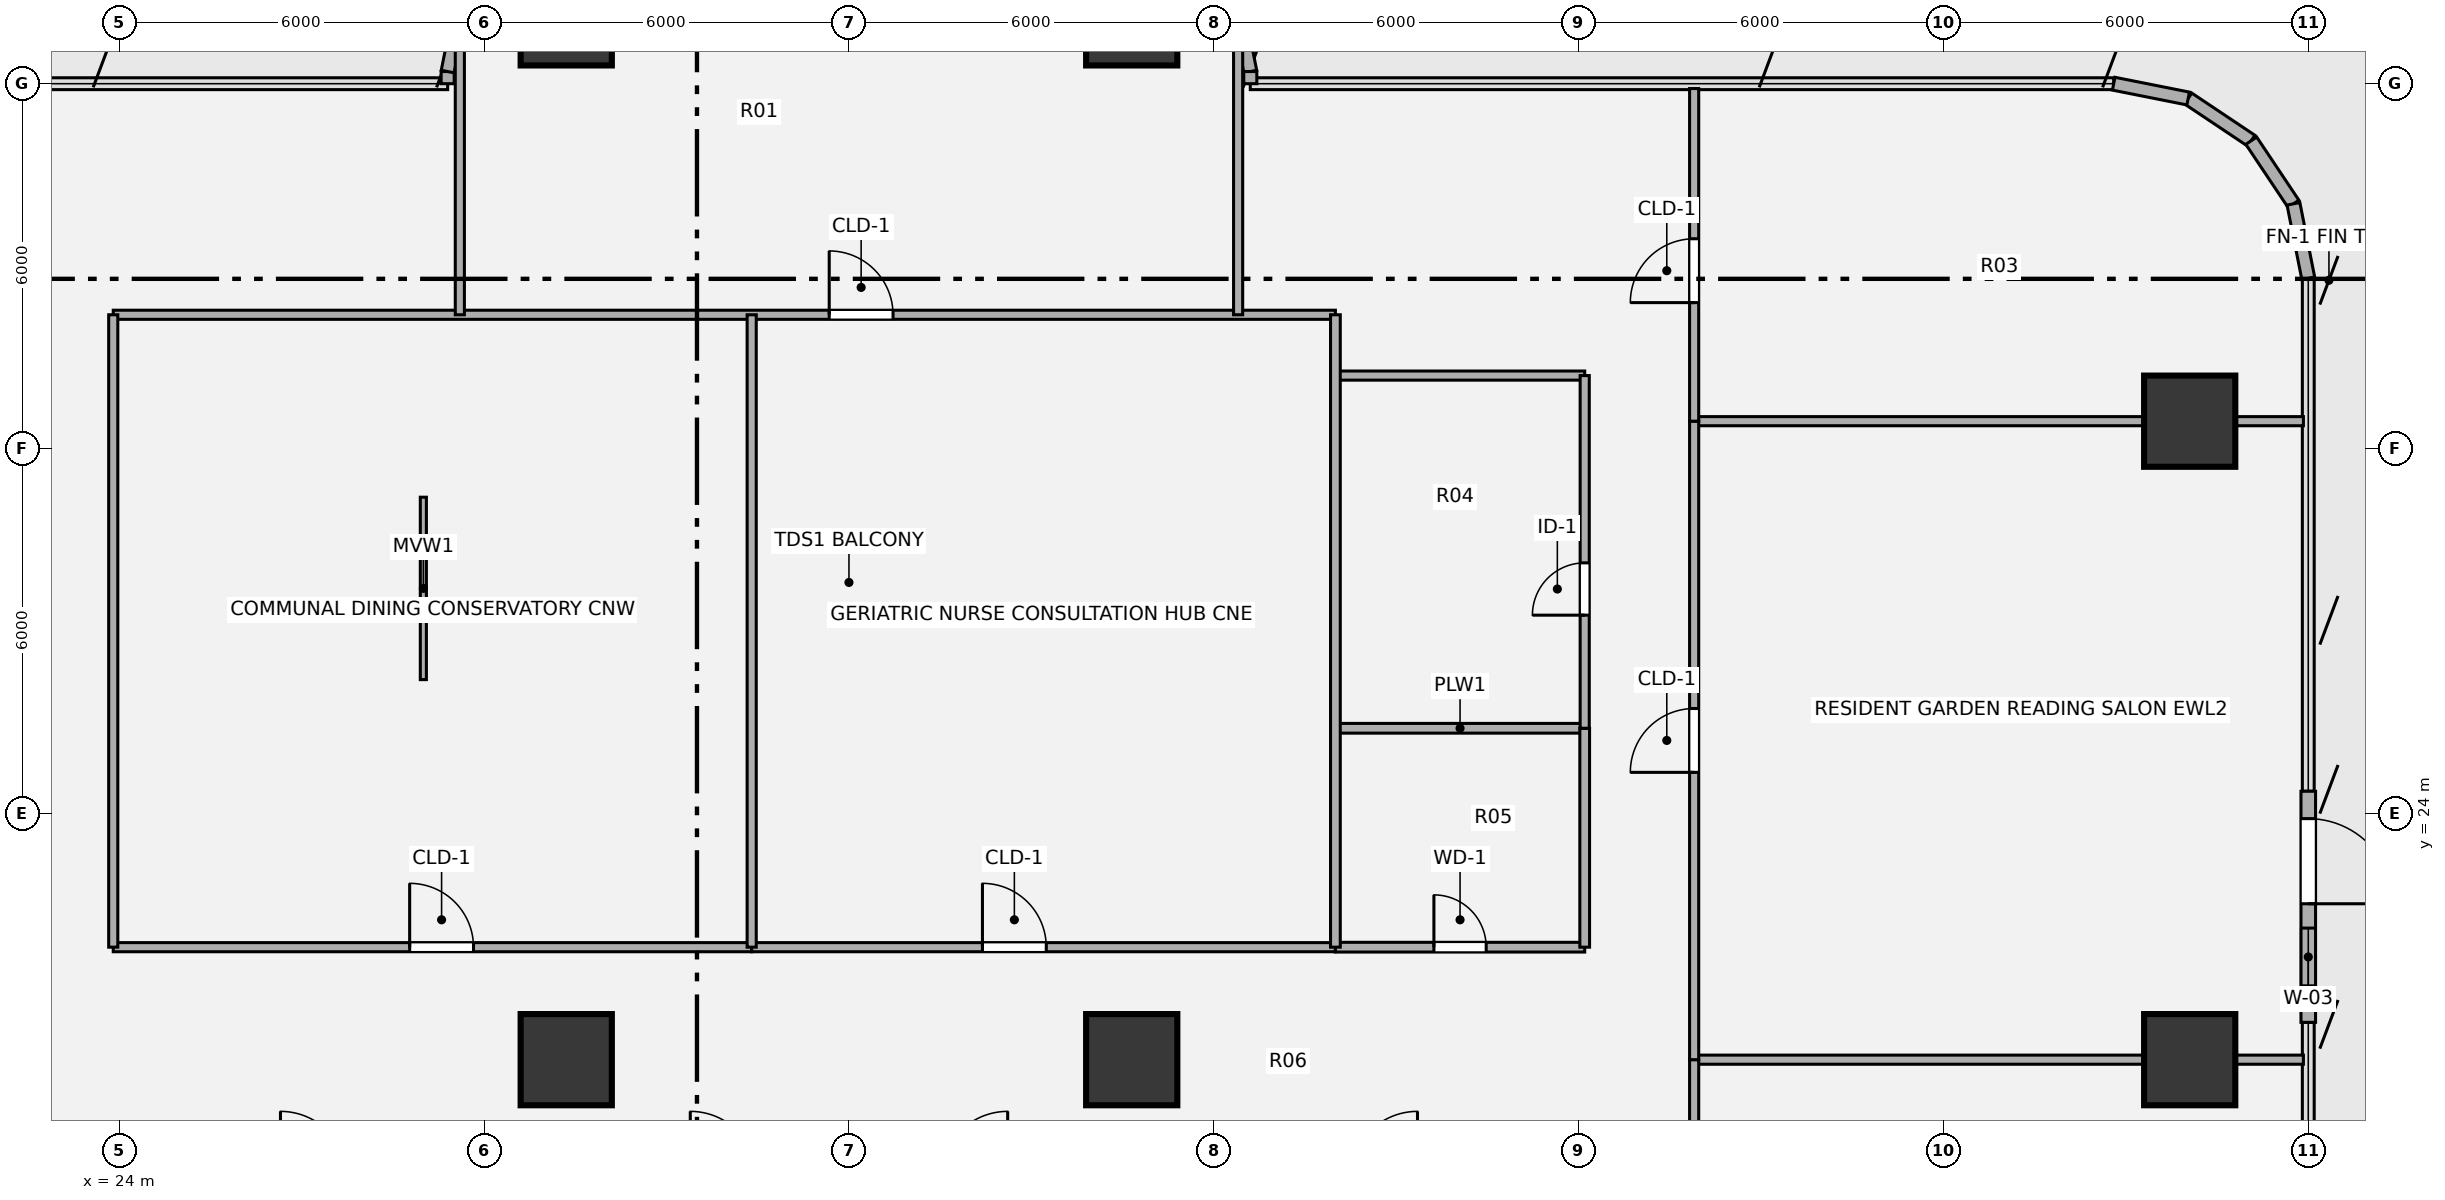
"""IFC4 building model, lengths in metres.
Left out: names, types, materials, properties, quantities, classifications, styles, units other than length and angle.
Written with IfcOpenShell. Run it as: python <this file> out.ifc"""

import sys

from ifc_helpers import new_model, si_unit, direction, frame, frame_2d, origin, origin_2d, place, context, subcontext, project, spatial, rectangle, hollow_circle, extrude, source, transform, mapped, element, fill, save


model = new_model("IFC4")
c1 = context("Model", 3, precision=1e-05, world=origin(), true_north=direction((0.0, 1.0)))
c2 = subcontext(c1, "Body", "Model", "MODEL_VIEW")
j1 = project(units=[si_unit("LENGTHUNIT", "METRE"), si_unit("PLANEANGLEUNIT", "RADIAN")], contexts=[c1])
p1 = place(None, origin())
s1 = spatial("IfcSite", under=j1, at=p1, CompositionType="ELEMENT")
p2 = place(p1, origin())
s2 = spatial("IfcBuilding", under=s1, at=p2, CompositionType="ELEMENT")
p3 = place(p2, frame((0.0, 0.0, 27.0)))
s3 = spatial("IfcBuildingStorey", under=s2, at=p3, CompositionType="ELEMENT", Elevation=27.0)
m1 = source(origin(), c2, "Body", "SweptSolid", [
    extrude(hollow_circle(Radius=0.75, WallThickness=0.05, at=origin_2d()), origin(), (0.0, 0.0, 1.0), 3.78),
])
for number, where, z_axis, x_axis in (
    (1, (58.05, 19.95, 0.0), (0.0, 0.0, 1.0), (1.0, 0.0, 0.0)),
    (2, (58.05, 30.45, 0.0), (0.0, 0.0, 1.0), (1.0, 0.0, 0.0)),
    (3, (31.35, 19.95, 0.0), (0.0, 0.0, 1.0), (1.0, 0.0, 0.0)),
    (4, (40.65, 19.95, 0.0), (0.0, 0.0, 1.0), (1.0, 0.0, 0.0)),
    (5, (31.35, 37.05, 0.0), (0.0, 0.0, 1.0), (1.0, 0.0, 0.0)),
    (6, (40.65, 37.05, 0.0), (0.0, 0.0, 1.0), (1.0, 0.0, 0.0)),
):
    element("IfcColumn", number, at=place(p3, frame(where, z_axis=z_axis, x_axis=x_axis)), inside=s3, PredefinedType="COLUMN", context=c2, shape_type="MappedRepresentation", body=[
        mapped(m1, transform((0.0, 0.0, 0.0), x_axis=(1.0, 0.0, 0.0), y_axis=(0.0, 1.0, 0.0), z_axis=(0.0, 0.0, 1.0), scale=1.0)),
    ])
for number, where, z_axis, x_axis in (
    (7, (58.025, 35.756, 0.0), (0.0, 0.0, 1.0), (0.831, -0.556, 0.0)),
    (8, (59.063, 35.063, 0.0), (0.0, 0.0, 1.0), (0.556, -0.831, 0.0)),
    (9, (59.756, 34.025, 0.0), (0.0, 0.0, 1.0), (0.195, -0.981, 0.0)),
):
    element("IfcWall", number, at=place(p3, frame(where, z_axis=z_axis, x_axis=x_axis)), inside=s3, PredefinedType="SOLIDWALL", context=c2, shape_type="SweptSolid", body=[
        extrude(rectangle(XDim=1.249, YDim=0.215, at=frame_2d((0.624, 0.0))), origin(), (0.0, 0.0, 1.0), 3.53),
    ])
p4 = place(p3, frame((60.0, 24.364, 0.0), z_axis=(0.0, 0.0, 1.0), x_axis=(0.0, -1.0, 0.0)))
e10 = element("IfcWall", 10, at=p4, inside=s3, PredefinedType="SOLIDWALL", context=c2, shape_type="SweptSolid", body=[
    extrude(rectangle(XDim=3.8, YDim=0.24, at=frame_2d((1.9, 0.0))), origin(), (0.0, 0.0, 1.0), 3.53),
])
p5 = place(p4, frame((0.45, 0.0, 0.0)))
e11 = element("IfcOpeningElement", 11, at=p5, cuts=e10, PredefinedType="OPENING", context=c2, shape_type="SweptSolid", body=[
    extrude(rectangle(XDim=1.4, YDim=2.15, at=origin_2d()), frame((0.7, 0.13, 1.075), z_axis=(0.0, -1.0, 0.0), x_axis=(1.0, 0.0, 0.0)), (0.0, 0.0, 1.0), 0.26),
])
p6 = place(p4, frame((2.25, 0.0, 0.85)))
e12 = element("IfcOpeningElement", 12, at=p6, cuts=e10, PredefinedType="OPENING", context=c2, shape_type="SweptSolid", body=[
    extrude(rectangle(XDim=0.95, YDim=1.35, at=origin_2d()), frame((0.475, 0.13, 0.675), z_axis=(0.0, -1.0, 0.0), x_axis=(1.0, 0.0, 0.0)), (0.0, 0.0, 1.0), 0.26),
])
p7 = place(p3, frame((29.4, 36.0, 0.0), z_axis=(0.0, 0.0, 1.0), x_axis=(0.0, 1.0, 0.0)))
e13 = element("IfcWall", 13, at=p7, inside=s3, PredefinedType="SOLIDWALL", context=c2, shape_type="SweptSolid", body=[
    extrude(rectangle(XDim=0.2, YDim=0.215, at=frame_2d((0.1, 0.0))), origin(), (0.0, 0.0, 1.0), 3.53),
])
for number, where, z_axis, x_axis in (
    (14, (29.4, 36.2, 0.0), (0.0, 0.0, 1.0), (0.195, 0.981, 0.0)),
    (15, (42.387, 37.271, 0.0), (0.0, 0.0, 1.0), (0.195, -0.981, 0.0)),
):
    element("IfcWall", number, at=place(p3, frame(where, z_axis=z_axis, x_axis=x_axis)), inside=s3, PredefinedType="SOLIDWALL", context=c2, shape_type="SweptSolid", body=[
        extrude(rectangle(XDim=1.093, YDim=0.215, at=frame_2d((0.546, 0.0))), origin(), (0.0, 0.0, 1.0), 3.53),
    ])
p8 = place(p3, frame((42.6, 36.2, 0.0), z_axis=(0.0, 0.0, 1.0), x_axis=(0.0, -1.0, 0.0)))
e16 = element("IfcWall", 16, at=p8, inside=s3, PredefinedType="SOLIDWALL", context=c2, shape_type="SweptSolid", body=[
    extrude(rectangle(XDim=0.2, YDim=0.215, at=frame_2d((0.1, 0.0))), origin(), (0.0, 0.0, 1.0), 3.53),
])
p9 = place(p3, frame((56.8, 36.0, 0.0), z_axis=(0.0, 0.0, 1.0), x_axis=(0.980775717779, -0.195138390419, 0.0)))
e17 = element("IfcWall", 17, at=p9, inside=s3, PredefinedType="SOLIDWALL", context=c2, shape_type="SweptSolid", body=[
    extrude(rectangle(XDim=1.249, YDim=0.215, at=frame_2d((0.624, 0.0))), origin(), (0.0, 0.0, 1.0), 3.53),
])
p10 = place(p3, frame((49.9, 19.95, 0.0), z_axis=(0.0, 0.0, 1.0), x_axis=(1.0, 0.0, 0.0)))
e18 = element("IfcWall", 18, at=p10, inside=s3, PredefinedType="PARTITIONING", context=c2, shape_type="SweptSolid", body=[
    extrude(rectangle(XDim=10.02, YDim=0.15, at=frame_2d((5.01, 0.0))), origin(), (0.0, 0.0, 1.0), 2.715),
])
p11 = place(p3, frame((23.9, 21.8, 0.0), z_axis=(0.0, 0.0, 1.0), x_axis=(1.0, 0.0, 0.0)))
e19 = element("IfcWall", 19, at=p11, inside=s3, PredefinedType="PARTITIONING", context=c2, shape_type="SweptSolid", body=[
    extrude(rectangle(XDim=10.5, YDim=0.15, at=frame_2d((5.25, 0.0))), origin(), (0.0, 0.0, 1.0), 2.982),
])
p12 = place(p11, frame((4.875, 0.0, 0.0)))
e20 = element("IfcOpeningElement", 20, at=p12, cuts=e19, PredefinedType="OPENING", context=c2, shape_type="SweptSolid", body=[
    extrude(rectangle(XDim=1.05, YDim=2.1, at=origin_2d()), frame((0.525, 0.085, 1.05), z_axis=(0.0, -1.0, 0.0), x_axis=(1.0, 0.0, 0.0)), (0.0, 0.0, 1.0), 0.17),
])
p13 = place(p3, frame((34.4, 21.8, 0.0), z_axis=(0.0, 0.0, 1.0), x_axis=(1.0, 0.0, 0.0)))
e21 = element("IfcWall", 21, at=p13, inside=s3, PredefinedType="PARTITIONING", context=c2, shape_type="SweptSolid", body=[
    extrude(rectangle(XDim=9.6, YDim=0.15, at=frame_2d((4.8, 0.0))), origin(), (0.0, 0.0, 1.0), 2.982),
])
p14 = place(p13, frame((3.795, 0.0, 0.0)))
e22 = element("IfcOpeningElement", 22, at=p14, cuts=e21, PredefinedType="OPENING", context=c2, shape_type="SweptSolid", body=[
    extrude(rectangle(XDim=1.05, YDim=2.1, at=origin_2d()), frame((0.525, 0.085, 1.05), z_axis=(0.0, -1.0, 0.0), x_axis=(1.0, 0.0, 0.0)), (0.0, 0.0, 1.0), 0.17),
])
p15 = place(p3, frame((44.0, 21.8, 0.0), z_axis=(0.0, 0.0, 1.0), x_axis=(1.0, 0.0, 0.0)))
e23 = element("IfcWall", 23, at=p15, inside=s3, PredefinedType="PLUMBINGWALL", context=c2, shape_type="SweptSolid", body=[
    extrude(rectangle(XDim=4.1, YDim=0.16, at=frame_2d((2.05, 0.0))), origin(), (0.0, 0.0, 1.0), 2.982),
])
p16 = place(p15, frame((1.62, 0.0, 0.0)))
e24 = element("IfcOpeningElement", 24, at=p16, cuts=e23, PredefinedType="OPENING", context=c2, shape_type="SweptSolid", body=[
    extrude(rectangle(XDim=0.86, YDim=2.1, at=origin_2d()), frame((0.43, 0.09, 1.05), z_axis=(0.0, -1.0, 0.0), x_axis=(1.0, 0.0, 0.0)), (0.0, 0.0, 1.0), 0.18),
])
p17 = place(p3, frame((44.0, 25.4, 0.0), z_axis=(0.0, 0.0, 1.0), x_axis=(1.0, 0.0, 0.0)))
e25 = element("IfcWall", 25, at=p17, inside=s3, PredefinedType="PLUMBINGWALL", context=c2, shape_type="SweptSolid", body=[
    extrude(rectangle(XDim=4.1, YDim=0.16, at=frame_2d((2.05, 0.0))), origin(), (0.0, 0.0, 1.0), 3.055),
])
p18 = place(p3, frame((49.9, 30.45, 0.0), z_axis=(0.0, 0.0, 1.0), x_axis=(1.0, 0.0, 0.0)))
e26 = element("IfcWall", 26, at=p18, inside=s3, PredefinedType="PARTITIONING", context=c2, shape_type="SweptSolid", body=[
    extrude(rectangle(XDim=10.02, YDim=0.15, at=frame_2d((5.01, 0.0))), origin(), (0.0, 0.0, 1.0), 2.903),
])
p19 = place(p3, frame((44.0, 31.2, 0.0), z_axis=(0.0, 0.0, 1.0), x_axis=(1.0, 0.0, 0.0)))
e27 = element("IfcWall", 27, at=p19, inside=s3, PredefinedType="PARTITIONING", context=c2, shape_type="SweptSolid", body=[
    extrude(rectangle(XDim=4.1, YDim=0.15, at=frame_2d((2.05, 0.0))), origin(), (0.0, 0.0, 1.0), 3.5),
])
p20 = place(p3, frame((23.9, 32.2, 0.0), z_axis=(0.0, 0.0, 1.0), x_axis=(1.0, 0.0, 0.0)))
e28 = element("IfcWall", 28, at=p20, inside=s3, PredefinedType="PARTITIONING", context=c2, shape_type="SweptSolid", body=[
    extrude(rectangle(XDim=20.1, YDim=0.15, at=frame_2d((10.05, 0.0))), origin(), (0.0, 0.0, 1.0), 3.259),
])
p21 = place(p20, frame((11.775, 0.0, 0.0)))
e29 = element("IfcOpeningElement", 29, at=p21, cuts=e28, PredefinedType="OPENING", context=c2, shape_type="SweptSolid", body=[
    extrude(rectangle(XDim=1.05, YDim=2.1, at=origin_2d()), frame((0.525, 0.085, 1.05), z_axis=(0.0, -1.0, 0.0), x_axis=(1.0, 0.0, 0.0)), (0.0, 0.0, 1.0), 0.17),
])
p22 = place(p3, frame((23.9, 21.8, 0.0), z_axis=(0.0, 0.0, 1.0), x_axis=(0.0, 1.0, 0.0)))
e30 = element("IfcWall", 30, at=p22, inside=s3, PredefinedType="PARTITIONING", context=c2, shape_type="SweptSolid", body=[
    extrude(rectangle(XDim=10.4, YDim=0.15, at=frame_2d((5.2, 0.0))), origin(), (0.0, 0.0, 1.0), 3.5),
])
p23 = place(p3, frame((29.6, 32.2, 0.0), z_axis=(0.0, 0.0, 1.0), x_axis=(0.0, 1.0, 0.0)))
e31 = element("IfcWall", 31, at=p23, inside=s3, PredefinedType="PARTITIONING", context=c2, shape_type="SweptSolid", body=[
    extrude(rectangle(XDim=4.595, YDim=0.15, at=frame_2d((2.298, 0.0))), origin(), (0.0, 0.0, 1.0), 3.5),
])
p24 = place(p3, frame((34.4, 21.8, 0.0), z_axis=(0.0, 0.0, 1.0), x_axis=(0.0, 1.0, 0.0)))
e32 = element("IfcWall", 32, at=p24, inside=s3, PredefinedType="PARTITIONING", context=c2, shape_type="SweptSolid", body=[
    extrude(rectangle(XDim=10.4, YDim=0.15, at=frame_2d((5.2, 0.0))), origin(), (0.0, 0.0, 1.0), 3.5),
])
p25 = place(p3, frame((42.4, 32.2, 0.0), z_axis=(0.0, 0.0, 1.0), x_axis=(0.0, 1.0, 0.0)))
e33 = element("IfcWall", 33, at=p25, inside=s3, PredefinedType="PARTITIONING", context=c2, shape_type="SweptSolid", body=[
    extrude(rectangle(XDim=4.595, YDim=0.15, at=frame_2d((2.298, 0.0))), origin(), (0.0, 0.0, 1.0), 3.5),
])
p26 = place(p3, frame((44.0, 21.8, 0.0), z_axis=(0.0, 0.0, 1.0), x_axis=(0.0, 1.0, 0.0)))
e34 = element("IfcWall", 34, at=p26, inside=s3, PredefinedType="PLUMBINGWALL", context=c2, shape_type="SweptSolid", body=[
    extrude(rectangle(XDim=10.4, YDim=0.16, at=frame_2d((5.2, 0.0))), origin(), (0.0, 0.0, 1.0), 3.5),
])
p27 = place(p3, frame((48.1, 21.8, 0.0), z_axis=(0.0, 0.0, 1.0), x_axis=(0.0, 1.0, 0.0)))
e35 = element("IfcWall", 35, at=p27, inside=s3, PredefinedType="PLUMBINGWALL", context=c2, shape_type="SweptSolid", body=[
    extrude(rectangle(XDim=3.6, YDim=0.16, at=frame_2d((1.8, 0.0))), origin(), (0.0, 0.0, 1.0), 3.5),
])
p28 = place(p3, frame((48.1, 25.4, 0.0), z_axis=(0.0, 0.0, 1.0), x_axis=(0.0, 1.0, 0.0)))
e36 = element("IfcWall", 36, at=p28, inside=s3, PredefinedType="PARTITIONING", context=c2, shape_type="SweptSolid", body=[
    extrude(rectangle(XDim=5.8, YDim=0.15, at=frame_2d((2.9, 0.0))), origin(), (0.0, 0.0, 1.0), 3.5),
])
p29 = place(p28, frame((1.86, 0.0, 0.0)))
e37 = element("IfcOpeningElement", 37, at=p29, cuts=e36, PredefinedType="OPENING", context=c2, shape_type="SweptSolid", body=[
    extrude(rectangle(XDim=0.86, YDim=2.1, at=origin_2d()), frame((0.43, 0.085, 1.05), z_axis=(0.0, -1.0, 0.0), x_axis=(1.0, 0.0, 0.0)), (0.0, 0.0, 1.0), 0.17),
])
p30 = place(p3, frame((49.9, 6.08, 0.0), z_axis=(0.0, 0.0, 1.0), x_axis=(0.0, 1.0, 0.0)))
e38 = element("IfcWall", 38, at=p30, inside=s3, PredefinedType="PARTITIONING", context=c2, shape_type="SweptSolid", body=[
    extrude(rectangle(XDim=13.87, YDim=0.15, at=frame_2d((6.935, 0.0))), origin(), (0.0, 0.0, 1.0), 3.5),
])
p31 = place(p30, frame((6.41, 0.0, 0.0)))
e39 = element("IfcOpeningElement", 39, at=p31, cuts=e38, PredefinedType="OPENING", context=c2, shape_type="SweptSolid", body=[
    extrude(rectangle(XDim=1.05, YDim=2.1, at=origin_2d()), frame((0.525, 0.085, 1.05), z_axis=(0.0, -1.0, 0.0), x_axis=(1.0, 0.0, 0.0)), (0.0, 0.0, 1.0), 0.17),
])
p32 = place(p3, frame((49.9, 19.95, 0.0), z_axis=(0.0, 0.0, 1.0), x_axis=(0.0, 1.0, 0.0)))
e40 = element("IfcWall", 40, at=p32, inside=s3, PredefinedType="PARTITIONING", context=c2, shape_type="SweptSolid", body=[
    extrude(rectangle(XDim=10.5, YDim=0.15, at=frame_2d((5.25, 0.0))), origin(), (0.0, 0.0, 1.0), 3.5),
])
p33 = place(p32, frame((4.725, 0.0, 0.0)))
e41 = element("IfcOpeningElement", 41, at=p33, cuts=e40, PredefinedType="OPENING", context=c2, shape_type="SweptSolid", body=[
    extrude(rectangle(XDim=1.05, YDim=2.1, at=origin_2d()), frame((0.525, 0.085, 1.05), z_axis=(0.0, -1.0, 0.0), x_axis=(1.0, 0.0, 0.0)), (0.0, 0.0, 1.0), 0.17),
])
p34 = place(p3, frame((49.9, 30.45, 0.0), z_axis=(0.0, 0.0, 1.0), x_axis=(0.0, 1.0, 0.0)))
e42 = element("IfcWall", 42, at=p34, inside=s3, PredefinedType="PARTITIONING", context=c2, shape_type="SweptSolid", body=[
    extrude(rectangle(XDim=5.47, YDim=0.15, at=frame_2d((2.735, 0.0))), origin(), (0.0, 0.0, 1.0), 3.5),
])
p35 = place(p34, frame((1.95, 0.0, 0.0)))
e43 = element("IfcOpeningElement", 43, at=p35, cuts=e42, PredefinedType="OPENING", context=c2, shape_type="SweptSolid", body=[
    extrude(rectangle(XDim=1.05, YDim=2.1, at=origin_2d()), frame((0.525, 0.085, 1.05), z_axis=(0.0, -1.0, 0.0), x_axis=(1.0, 0.0, 0.0)), (0.0, 0.0, 1.0), 0.17),
])
p36 = place(p3, frame((29.0, 26.2, 0.0), z_axis=(0.0, 0.0, 1.0), x_axis=(0.0, 1.0, 0.0)))
e44 = element("IfcWall", 44, at=p36, inside=s3, PredefinedType="MOVABLE", context=c2, shape_type="SweptSolid", body=[
    extrude(rectangle(XDim=3.0, YDim=0.1, at=frame_2d((1.5, 0.0))), origin(), (0.0, 0.0, 1.0), 2.85),
])
m2 = source(origin(), c2, "Body", "SweptSolid", [
    extrude(rectangle(XDim=1.4, YDim=2.15, at=origin_2d()), frame((0.7, 0.025, 1.075), z_axis=(0.0, -1.0, 0.0), x_axis=(1.0, 0.0, 0.0)), (0.0, 0.0, 1.0), 0.05),
])
p37 = place(p5, origin())
e45 = element("IfcDoor", 45, at=p37, inside=s3, OperationType="SINGLE_SWING_RIGHT", PredefinedType="DOOR", context=c2, shape_type="MappedRepresentation", body=[
    mapped(m2, transform((0.0, 0.0, 0.0), x_axis=(1.0, 0.0, 0.0), y_axis=(0.0, 1.0, 0.0), z_axis=(0.0, 0.0, 1.0), scale=1.0)),
])
fill(e11, e45)
m3 = source(origin(), c2, "Body", "SweptSolid", [
    extrude(rectangle(XDim=0.95, YDim=1.35, at=origin_2d()), frame((0.475, 0.03, 0.675), z_axis=(0.0, -1.0, 0.0), x_axis=(1.0, 0.0, 0.0)), (0.0, 0.0, 1.0), 0.06),
])
p38 = place(p6, origin())
e46 = element("IfcWindow", 46, at=p38, inside=s3, PartitioningType="SINGLE_PANEL", PredefinedType="WINDOW", context=c2, shape_type="MappedRepresentation", body=[
    mapped(m3, transform((0.0, 0.0, 0.0), x_axis=(1.0, 0.0, 0.0), y_axis=(0.0, 1.0, 0.0), z_axis=(0.0, 0.0, 1.0), scale=1.0)),
])
fill(e12, e46)
m4 = source(origin(), c2, "Body", "SweptSolid", [
    extrude(rectangle(XDim=1.05, YDim=2.1, at=origin_2d()), frame((0.525, 0.025, 1.05), z_axis=(0.0, -1.0, 0.0), x_axis=(1.0, 0.0, 0.0)), (0.0, 0.0, 1.0), 0.05),
])
p39 = place(p12, origin())
e47 = element("IfcDoor", 47, at=p39, inside=s3, OperationType="SINGLE_SWING_LEFT", PredefinedType="DOOR", context=c2, shape_type="MappedRepresentation", body=[
    mapped(m4, transform((0.0, 0.0, 0.0), x_axis=(1.0, 0.0, 0.0), y_axis=(0.0, 1.0, 0.0), z_axis=(0.0, 0.0, 1.0), scale=1.0)),
])
fill(e20, e47)
p40 = place(p14, origin())
e48 = element("IfcDoor", 48, at=p40, inside=s3, OperationType="SINGLE_SWING_LEFT", PredefinedType="DOOR", context=c2, shape_type="MappedRepresentation", body=[
    mapped(m4, transform((0.0, 0.0, 0.0), x_axis=(1.0, 0.0, 0.0), y_axis=(0.0, 1.0, 0.0), z_axis=(0.0, 0.0, 1.0), scale=1.0)),
])
fill(e22, e48)
m5 = source(origin(), c2, "Body", "SweptSolid", [
    extrude(rectangle(XDim=0.86, YDim=2.1, at=origin_2d()), frame((0.43, 0.025, 1.05), z_axis=(0.0, -1.0, 0.0), x_axis=(1.0, 0.0, 0.0)), (0.0, 0.0, 1.0), 0.05),
])
p41 = place(p16, origin())
e49 = element("IfcDoor", 49, at=p41, inside=s3, OperationType="SINGLE_SWING_LEFT", PredefinedType="DOOR", context=c2, shape_type="MappedRepresentation", body=[
    mapped(m5, transform((0.0, 0.0, 0.0), x_axis=(1.0, 0.0, 0.0), y_axis=(0.0, 1.0, 0.0), z_axis=(0.0, 0.0, 1.0), scale=1.0)),
])
fill(e24, e49)
p42 = place(p21, origin())
e50 = element("IfcDoor", 50, at=p42, inside=s3, OperationType="SINGLE_SWING_LEFT", PredefinedType="DOOR", context=c2, shape_type="MappedRepresentation", body=[
    mapped(m4, transform((0.0, 0.0, 0.0), x_axis=(1.0, 0.0, 0.0), y_axis=(0.0, 1.0, 0.0), z_axis=(0.0, 0.0, 1.0), scale=1.0)),
])
fill(e29, e50)
m6 = source(origin(), c2, "Body", "SweptSolid", [
    extrude(rectangle(XDim=0.86, YDim=2.1, at=origin_2d()), frame((0.43, 0.025, 1.05), z_axis=(0.0, -1.0, 0.0), x_axis=(1.0, 0.0, 0.0)), (0.0, 0.0, 1.0), 0.05),
])
p43 = place(p29, origin())
e51 = element("IfcDoor", 51, at=p43, inside=s3, OperationType="SINGLE_SWING_LEFT", PredefinedType="DOOR", context=c2, shape_type="MappedRepresentation", body=[
    mapped(m6, transform((0.0, 0.0, 0.0), x_axis=(1.0, 0.0, 0.0), y_axis=(0.0, 1.0, 0.0), z_axis=(0.0, 0.0, 1.0), scale=1.0)),
])
fill(e37, e51)
p44 = place(p33, origin())
e52 = element("IfcDoor", 52, at=p44, inside=s3, OperationType="SINGLE_SWING_LEFT", PredefinedType="DOOR", context=c2, shape_type="MappedRepresentation", body=[
    mapped(m4, transform((0.0, 0.0, 0.0), x_axis=(1.0, 0.0, 0.0), y_axis=(0.0, 1.0, 0.0), z_axis=(0.0, 0.0, 1.0), scale=1.0)),
])
fill(e41, e52)
p45 = place(p35, origin())
e53 = element("IfcDoor", 53, at=p45, inside=s3, OperationType="SINGLE_SWING_LEFT", PredefinedType="DOOR", context=c2, shape_type="MappedRepresentation", body=[
    mapped(m4, transform((0.0, 0.0, 0.0), x_axis=(1.0, 0.0, 0.0), y_axis=(0.0, 1.0, 0.0), z_axis=(0.0, 0.0, 1.0), scale=1.0)),
])
fill(e43, e53)
save(model, sys.argv[1])
